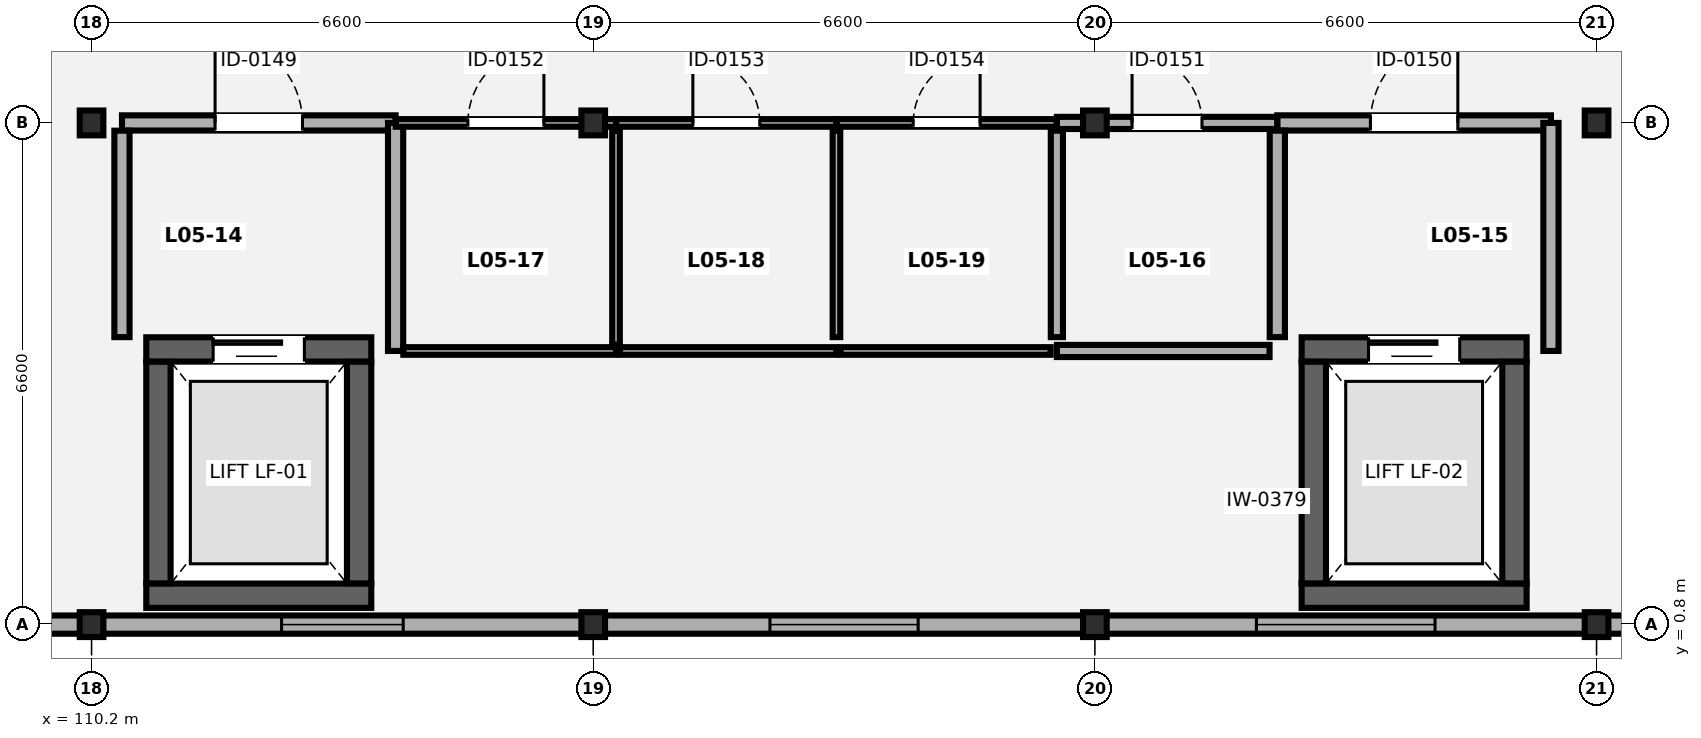
"""IFC4 building model, lengths in metres.
Left out: names, types, materials, properties, quantities, classifications, styles, units other than length and angle.
Written with IfcOpenShell. Run it as: python <this file> out.ifc"""

import sys

from ifc_helpers import new_model, si_unit, direction, frame, frame_2d, origin, origin_2d, place, context, subcontext, project, spatial, rectangle, i_section, extrude, element, fill, save


model = new_model("IFC4")
c1 = context("Model", 3, precision=1e-05, world=origin(), true_north=direction((0.0, 1.0)))
c2 = subcontext(c1, "Body", "Model", "MODEL_VIEW")
j1 = project(units=[si_unit("LENGTHUNIT", "METRE"), si_unit("PLANEANGLEUNIT", "RADIAN")], contexts=[c1])
p1 = place(None, origin())
s1 = spatial("IfcSite", under=j1, at=p1, CompositionType="ELEMENT")
p2 = place(p1, origin())
s2 = spatial("IfcBuilding", under=s1, at=p2, CompositionType="ELEMENT")
p3 = place(p2, frame((0.0, 0.0, 21.7)))
s3 = spatial("IfcBuildingStorey", under=s2, at=p3, CompositionType="ELEMENT", Elevation=21.7)
for number, where, z_axis, x_axis in (
    (1, (110.2, 0.8, 0.0), (0.0, 0.0, 1.0), (1.0, 0.0, 0.0)),
    (2, (110.2, 7.4, 0.0), (0.0, 0.0, 1.0), (1.0, 0.0, 0.0)),
    (3, (116.8, 0.8, 0.0), (0.0, 0.0, 1.0), (1.0, 0.0, 0.0)),
    (4, (116.8, 7.4, 0.0), (0.0, 0.0, 1.0), (1.0, 0.0, 0.0)),
    (5, (123.4, 0.8, 0.0), (0.0, 0.0, 1.0), (1.0, 0.0, 0.0)),
    (6, (123.4, 7.4, 0.0), (0.0, 0.0, 1.0), (1.0, 0.0, 0.0)),
    (7, (130.0, 0.8, 0.0), (0.0, 0.0, 1.0), (1.0, 0.0, 0.0)),
    (8, (130.0, 7.4, 0.0), (0.0, 0.0, 1.0), (1.0, 0.0, 0.0)),
):
    element("IfcColumn", number, at=place(p3, frame(where, z_axis=z_axis, x_axis=x_axis)), inside=s3, PredefinedType="COLUMN", context=c2, shape_type="SweptSolid", body=[
        extrude(i_section(OverallWidth=0.311, OverallDepth=0.327, WebThickness=0.016, FlangeThickness=0.025, FilletRadius=0.017, at=origin_2d()), origin(), (0.0, 0.0, 1.0), 4.2),
    ])
p4 = place(p3, frame((162.046, 0.8, 0.0), z_axis=(0.0, 0.0, 1.0), x_axis=(-1.0, 0.0, 0.0)))
e9 = element("IfcWall", 9, at=p4, inside=s3, PredefinedType="SOLIDWALL", context=c2, shape_type="SweptSolid", body=[
    extrude(rectangle(XDim=58.293, YDim=0.24, at=frame_2d((29.146, 0.0))), origin(), (0.0, 0.0, 1.0), 3.505),
])
p5 = place(p4, frame((54.471, 0.0, 0.85)))
e10 = element("IfcOpeningElement", 10, at=p5, cuts=e9, PredefinedType="OPENING", context=c2, shape_type="SweptSolid", body=[
    extrude(rectangle(XDim=1.35, YDim=1.5, at=frame_2d((0.675, 0.75))), frame((0.0, 0.13, 0.0), z_axis=(0.0, -1.0, 0.0), x_axis=(1.0, 0.0, 0.0)), (0.0, 0.0, 1.0), 0.26),
])
p6 = place(p4, frame((47.747, 0.0, 0.85)))
e11 = element("IfcOpeningElement", 11, at=p6, cuts=e9, PredefinedType="OPENING", context=c2, shape_type="SweptSolid", body=[
    extrude(rectangle(XDim=1.6, YDim=1.5, at=frame_2d((0.8, 0.75))), frame((0.0, 0.13, 0.0), z_axis=(0.0, -1.0, 0.0), x_axis=(1.0, 0.0, 0.0)), (0.0, 0.0, 1.0), 0.26),
])
p7 = place(p4, frame((40.971, 0.0, 0.85)))
e12 = element("IfcOpeningElement", 12, at=p7, cuts=e9, PredefinedType="OPENING", context=c2, shape_type="SweptSolid", body=[
    extrude(rectangle(XDim=1.95, YDim=1.5, at=frame_2d((0.975, 0.75))), frame((0.0, 0.13, 0.0), z_axis=(0.0, -1.0, 0.0), x_axis=(1.0, 0.0, 0.0)), (0.0, 0.0, 1.0), 0.26),
])
p8 = place(p4, frame((34.171, 0.0, 0.85)))
e13 = element("IfcOpeningElement", 13, at=p8, cuts=e9, PredefinedType="OPENING", context=c2, shape_type="SweptSolid", body=[
    extrude(rectangle(XDim=2.35, YDim=1.5, at=frame_2d((1.175, 0.75))), frame((0.0, 0.13, 0.0), z_axis=(0.0, -1.0, 0.0), x_axis=(1.0, 0.0, 0.0)), (0.0, 0.0, 1.0), 0.26),
])
p9 = place(p4, frame((27.396, 0.0, 0.85)))
e14 = element("IfcOpeningElement", 14, at=p9, cuts=e9, PredefinedType="OPENING", context=c2, shape_type="SweptSolid", body=[
    extrude(rectangle(XDim=2.7, YDim=1.35, at=frame_2d((1.35, 0.675))), frame((0.0, 0.13, 0.0), z_axis=(0.0, -1.0, 0.0), x_axis=(1.0, 0.0, 0.0)), (0.0, 0.0, 1.0), 0.26),
])
p10 = place(p4, frame((20.697, 0.0, 0.85)))
e15 = element("IfcOpeningElement", 15, at=p10, cuts=e9, PredefinedType="OPENING", context=c2, shape_type="SweptSolid", body=[
    extrude(rectangle(XDim=2.9, YDim=1.35, at=frame_2d((1.45, 0.675))), frame((0.0, 0.13, 0.0), z_axis=(0.0, -1.0, 0.0), x_axis=(1.0, 0.0, 0.0)), (0.0, 0.0, 1.0), 0.26),
])
p11 = place(p4, frame((14.997, 0.0, 0.85)))
e16 = element("IfcOpeningElement", 16, at=p11, cuts=e9, PredefinedType="OPENING", context=c2, shape_type="SweptSolid", body=[
    extrude(rectangle(XDim=1.1, YDim=1.4, at=frame_2d((0.55, 0.7))), frame((0.0, 0.13, 0.0), z_axis=(0.0, -1.0, 0.0), x_axis=(1.0, 0.0, 0.0)), (0.0, 0.0, 1.0), 0.26),
])
p12 = place(p4, frame((8.322, 0.0, 0.85)))
e17 = element("IfcOpeningElement", 17, at=p12, cuts=e9, PredefinedType="OPENING", context=c2, shape_type="SweptSolid", body=[
    extrude(rectangle(XDim=1.25, YDim=1.4, at=frame_2d((0.625, 0.7))), frame((0.0, 0.13, 0.0), z_axis=(0.0, -1.0, 0.0), x_axis=(1.0, 0.0, 0.0)), (0.0, 0.0, 1.0), 0.26),
])
p13 = place(p4, frame((2.046, 0.0, 0.85)))
e18 = element("IfcOpeningElement", 18, at=p13, cuts=e9, PredefinedType="OPENING", context=c2, shape_type="SweptSolid", body=[
    extrude(rectangle(XDim=1.4, YDim=1.4, at=frame_2d((0.7, 0.7))), frame((0.0, 0.13, 0.0), z_axis=(0.0, -1.0, 0.0), x_axis=(1.0, 0.0, 0.0)), (0.0, 0.0, 1.0), 0.26),
])
p14 = place(p3, frame((110.92, 1.18, 0.0), z_axis=(0.0, 0.0, 1.0), x_axis=(1.0, 0.0, 0.0)))
e19 = element("IfcWall", 19, at=p14, inside=s3, PredefinedType="SHEAR", context=c2, shape_type="SweptSolid", body=[
    extrude(rectangle(XDim=2.96, YDim=0.32, at=frame_2d((1.48, 0.0))), origin(), (0.0, 0.0, 1.0), 4.02),
])
p15 = place(p3, frame((110.92, 4.42, 0.0), z_axis=(0.0, 0.0, 1.0), x_axis=(1.0, 0.0, 0.0)))
e20 = element("IfcWall", 20, at=p15, inside=s3, PredefinedType="SHEAR", context=c2, shape_type="SweptSolid", body=[
    extrude(rectangle(XDim=2.96, YDim=0.32, at=frame_2d((1.48, 0.0))), origin(), (0.0, 0.0, 1.0), 4.02),
])
p16 = place(p15, frame((0.88, 0.0, 0.0)))
e21 = element("IfcOpeningElement", 21, at=p16, cuts=e20, PredefinedType="OPENING", context=c2, shape_type="SweptSolid", body=[
    extrude(rectangle(XDim=1.2, YDim=2.2, at=frame_2d((0.6, 1.1))), frame((0.0, 0.17, 0.0), z_axis=(0.0, -1.0, 0.0), x_axis=(1.0, 0.0, 0.0)), (0.0, 0.0, 1.0), 0.34),
])
for number, where, z_axis, x_axis in (
    (22, (111.08, 1.342, 0.0), (0.0, 0.0, 1.0), (0.0, 1.0, 0.0)),
    (23, (113.72, 1.342, 0.0), (0.0, 0.0, 1.0), (0.0, 1.0, 0.0)),
):
    element("IfcWall", number, at=place(p3, frame(where, z_axis=z_axis, x_axis=x_axis)), inside=s3, PredefinedType="SHEAR", context=c2, shape_type="SweptSolid", body=[
        extrude(rectangle(XDim=2.916, YDim=0.32, at=frame_2d((1.458, 0.0))), origin(), (0.0, 0.0, 1.0), 4.02),
    ])
p17 = place(p3, frame((126.12, 1.18, 0.0), z_axis=(0.0, 0.0, 1.0), x_axis=(1.0, 0.0, 0.0)))
e24 = element("IfcWall", 24, at=p17, inside=s3, PredefinedType="SHEAR", context=c2, shape_type="SweptSolid", body=[
    extrude(rectangle(XDim=2.96, YDim=0.32, at=frame_2d((1.48, 0.0))), origin(), (0.0, 0.0, 1.0), 4.02),
])
p18 = place(p3, frame((126.12, 4.42, 0.0), z_axis=(0.0, 0.0, 1.0), x_axis=(1.0, 0.0, 0.0)))
e25 = element("IfcWall", 25, at=p18, inside=s3, PredefinedType="SHEAR", context=c2, shape_type="SweptSolid", body=[
    extrude(rectangle(XDim=2.96, YDim=0.32, at=frame_2d((1.48, 0.0))), origin(), (0.0, 0.0, 1.0), 4.02),
])
p19 = place(p18, frame((0.88, 0.0, 0.0)))
e26 = element("IfcOpeningElement", 26, at=p19, cuts=e25, PredefinedType="OPENING", context=c2, shape_type="SweptSolid", body=[
    extrude(rectangle(XDim=1.2, YDim=2.2, at=frame_2d((0.6, 1.1))), frame((0.0, 0.17, 0.0), z_axis=(0.0, -1.0, 0.0), x_axis=(1.0, 0.0, 0.0)), (0.0, 0.0, 1.0), 0.34),
])
for number, where, z_axis, x_axis in (
    (27, (126.28, 1.342, 0.0), (0.0, 0.0, 1.0), (0.0, 1.0, 0.0)),
    (28, (128.92, 1.342, 0.0), (0.0, 0.0, 1.0), (0.0, 1.0, 0.0)),
):
    element("IfcWall", number, at=place(p3, frame(where, z_axis=z_axis, x_axis=x_axis)), inside=s3, PredefinedType="SHEAR", context=c2, shape_type="SweptSolid", body=[
        extrude(rectangle(XDim=2.916, YDim=0.32, at=frame_2d((1.458, 0.0))), origin(), (0.0, 0.0, 1.0), 4.02),
    ])
p20 = place(p3, frame((110.6, 7.4, 0.0), z_axis=(0.0, 0.0, 1.0), x_axis=(1.0, 0.0, 0.0)))
e29 = element("IfcWall", 29, at=p20, inside=s3, PredefinedType="SOLIDWALL", context=c2, shape_type="SweptSolid", body=[
    extrude(rectangle(XDim=3.6, YDim=0.2, at=frame_2d((1.8, 0.0))), origin(), (0.0, 0.0, 1.0), 3.293),
])
p21 = place(p20, frame((1.225, 0.0, 0.0)))
e30 = element("IfcOpeningElement", 30, at=p21, cuts=e29, PredefinedType="OPENING", context=c2, shape_type="SweptSolid", body=[
    extrude(rectangle(XDim=1.15, YDim=2.15, at=frame_2d((0.575, 1.075))), frame((0.0, 0.11, 0.0), z_axis=(0.0, -1.0, 0.0), x_axis=(1.0, 0.0, 0.0)), (0.0, 0.0, 1.0), 0.22),
])
p22 = place(p3, frame((110.6, 4.582, 0.0), z_axis=(0.0, 0.0, 1.0), x_axis=(0.0, 1.0, 0.0)))
e31 = element("IfcWall", 31, at=p22, inside=s3, PredefinedType="SOLIDWALL", context=c2, shape_type="SweptSolid", body=[
    extrude(rectangle(XDim=2.716, YDim=0.2, at=frame_2d((1.358, 0.0))), origin(), (0.0, 0.0, 1.0), 4.02),
])
p23 = place(p3, frame((114.2, 4.4, 0.0), z_axis=(0.0, 0.0, 1.0), x_axis=(0.0, 1.0, 0.0)))
e32 = element("IfcWall", 32, at=p23, inside=s3, PredefinedType="SOLIDWALL", context=c2, shape_type="SweptSolid", body=[
    extrude(rectangle(XDim=3.0, YDim=0.2, at=frame_2d((1.5, 0.0))), origin(), (0.0, 0.0, 1.0), 4.02),
])
p24 = place(p3, frame((125.8, 7.4, 0.0), z_axis=(0.0, 0.0, 1.0), x_axis=(1.0, 0.0, 0.0)))
e33 = element("IfcWall", 33, at=p24, inside=s3, PredefinedType="SOLIDWALL", context=c2, shape_type="SweptSolid", body=[
    extrude(rectangle(XDim=3.6, YDim=0.2, at=frame_2d((1.8, 0.0))), origin(), (0.0, 0.0, 1.0), 3.293),
])
p25 = place(p24, frame((1.225, 0.0, 0.0)))
e34 = element("IfcOpeningElement", 34, at=p25, cuts=e33, PredefinedType="OPENING", context=c2, shape_type="SweptSolid", body=[
    extrude(rectangle(XDim=1.15, YDim=2.15, at=frame_2d((0.575, 1.075))), frame((0.0, 0.11, 0.0), z_axis=(0.0, -1.0, 0.0), x_axis=(1.0, 0.0, 0.0)), (0.0, 0.0, 1.0), 0.22),
])
p26 = place(p3, frame((125.8, 4.582, 0.0), z_axis=(0.0, 0.0, 1.0), x_axis=(0.0, 1.0, 0.0)))
e35 = element("IfcWall", 35, at=p26, inside=s3, PredefinedType="SOLIDWALL", context=c2, shape_type="SweptSolid", body=[
    extrude(rectangle(XDim=2.716, YDim=0.2, at=frame_2d((1.358, 0.0))), origin(), (0.0, 0.0, 1.0), 4.02),
])
p27 = place(p3, frame((129.4, 4.4, 0.0), z_axis=(0.0, 0.0, 1.0), x_axis=(0.0, 1.0, 0.0)))
e36 = element("IfcWall", 36, at=p27, inside=s3, PredefinedType="SOLIDWALL", context=c2, shape_type="SweptSolid", body=[
    extrude(rectangle(XDim=3.0, YDim=0.2, at=frame_2d((1.5, 0.0))), origin(), (0.0, 0.0, 1.0), 4.02),
])
p28 = place(p3, frame((122.9, 4.4, 0.0), z_axis=(0.0, 0.0, 1.0), x_axis=(1.0, 0.0, 0.0)))
e37 = element("IfcWall", 37, at=p28, inside=s3, PredefinedType="PARTITIONING", context=c2, shape_type="SweptSolid", body=[
    extrude(rectangle(XDim=2.798, YDim=0.16, at=frame_2d((1.399, 0.0))), origin(), (0.0, 0.0, 1.0), 3.546),
])
p29 = place(p3, frame((122.9, 7.4, 0.0), z_axis=(0.0, 0.0, 1.0), x_axis=(1.0, 0.0, 0.0)))
e38 = element("IfcWall", 38, at=p29, inside=s3, PredefinedType="PARTITIONING", context=c2, shape_type="SweptSolid", body=[
    extrude(rectangle(XDim=2.898, YDim=0.16, at=frame_2d((1.449, 0.0))), origin(), (0.0, 0.0, 1.0), 3.293),
])
p30 = place(p29, frame((0.989, 0.0, 0.0)))
e39 = element("IfcOpeningElement", 39, at=p30, cuts=e38, PredefinedType="OPENING", context=c2, shape_type="SweptSolid", body=[
    extrude(rectangle(XDim=0.92, YDim=2.12, at=frame_2d((0.46, 1.06))), frame((0.0, 0.09, 0.0), z_axis=(0.0, -1.0, 0.0), x_axis=(1.0, 0.0, 0.0)), (0.0, 0.0, 1.0), 0.18),
])
p31 = place(p3, frame((122.9, 4.582, 0.0), z_axis=(0.0, 0.0, 1.0), x_axis=(0.0, 1.0, 0.0)))
e40 = element("IfcWall", 40, at=p31, inside=s3, PredefinedType="PARTITIONING", context=c2, shape_type="SweptSolid", body=[
    extrude(rectangle(XDim=2.716, YDim=0.16, at=frame_2d((1.358, 0.0))), origin(), (0.0, 0.0, 1.0), 4.02),
])
p32 = place(p3, frame((114.302, 4.4, 0.0), z_axis=(0.0, 0.0, 1.0), x_axis=(1.0, 0.0, 0.0)))
e41 = element("IfcWall", 41, at=p32, inside=s3, PredefinedType="PARTITIONING", context=c2, shape_type="SweptSolid", body=[
    extrude(rectangle(XDim=2.798, YDim=0.1, at=frame_2d((1.399, 0.0))), origin(), (0.0, 0.0, 1.0), 4.02),
])
p33 = place(p3, frame((114.202, 7.4, 0.0), z_axis=(0.0, 0.0, 1.0), x_axis=(1.0, 0.0, 0.0)))
e42 = element("IfcWall", 42, at=p33, inside=s3, PredefinedType="PARTITIONING", context=c2, shape_type="SweptSolid", body=[
    extrude(rectangle(XDim=2.898, YDim=0.1, at=frame_2d((1.449, 0.0))), origin(), (0.0, 0.0, 1.0), 3.293),
])
p34 = place(p33, frame((0.949, 0.0, 0.0)))
e43 = element("IfcOpeningElement", 43, at=p34, cuts=e42, PredefinedType="OPENING", context=c2, shape_type="SweptSolid", body=[
    extrude(rectangle(XDim=1.0, YDim=2.1, at=frame_2d((0.5, 1.05))), frame((0.0, 0.06, 0.0), z_axis=(0.0, -1.0, 0.0), x_axis=(1.0, 0.0, 0.0)), (0.0, 0.0, 1.0), 0.12),
])
p35 = place(p3, frame((117.1, 4.482, 0.0), z_axis=(0.0, 0.0, 1.0), x_axis=(0.0, 1.0, 0.0)))
e44 = element("IfcWall", 44, at=p35, inside=s3, PredefinedType="PARTITIONING", context=c2, shape_type="SweptSolid", body=[
    extrude(rectangle(XDim=2.816, YDim=0.1, at=frame_2d((1.408, 0.0))), origin(), (0.0, 0.0, 1.0), 4.02),
])
p36 = place(p3, frame((117.152, 4.4, 0.0), z_axis=(0.0, 0.0, 1.0), x_axis=(1.0, 0.0, 0.0)))
e45 = element("IfcWall", 45, at=p36, inside=s3, PredefinedType="PARTITIONING", context=c2, shape_type="SweptSolid", body=[
    extrude(rectangle(XDim=2.848, YDim=0.1, at=frame_2d((1.424, 0.0))), origin(), (0.0, 0.0, 1.0), 4.02),
])
p37 = place(p3, frame((117.102, 7.4, 0.0), z_axis=(0.0, 0.0, 1.0), x_axis=(1.0, 0.0, 0.0)))
e46 = element("IfcWall", 46, at=p37, inside=s3, PredefinedType="PARTITIONING", context=c2, shape_type="SweptSolid", body=[
    extrude(rectangle(XDim=2.898, YDim=0.1, at=frame_2d((1.449, 0.0))), origin(), (0.0, 0.0, 1.0), 3.293),
])
p38 = place(p37, frame((1.009, 0.0, 0.0)))
e47 = element("IfcOpeningElement", 47, at=p38, cuts=e46, PredefinedType="OPENING", context=c2, shape_type="SweptSolid", body=[
    extrude(rectangle(XDim=0.88, YDim=2.08, at=frame_2d((0.44, 1.04))), frame((0.0, 0.06, 0.0), z_axis=(0.0, -1.0, 0.0), x_axis=(1.0, 0.0, 0.0)), (0.0, 0.0, 1.0), 0.12),
])
p39 = place(p3, frame((120.0, 4.582, 0.0), z_axis=(0.0, 0.0, 1.0), x_axis=(0.0, 1.0, 0.0)))
e48 = element("IfcWall", 48, at=p39, inside=s3, PredefinedType="PARTITIONING", context=c2, shape_type="SweptSolid", body=[
    extrude(rectangle(XDim=2.716, YDim=0.1, at=frame_2d((1.358, 0.0))), origin(), (0.0, 0.0, 1.0), 4.02),
])
p40 = place(p3, frame((120.052, 4.4, 0.0), z_axis=(0.0, 0.0, 1.0), x_axis=(1.0, 0.0, 0.0)))
e49 = element("IfcWall", 49, at=p40, inside=s3, PredefinedType="PARTITIONING", context=c2, shape_type="SweptSolid", body=[
    extrude(rectangle(XDim=2.766, YDim=0.1, at=frame_2d((1.383, 0.0))), origin(), (0.0, 0.0, 1.0), 4.02),
])
p41 = place(p3, frame((120.002, 7.4, 0.0), z_axis=(0.0, 0.0, 1.0), x_axis=(1.0, 0.0, 0.0)))
e50 = element("IfcWall", 50, at=p41, inside=s3, PredefinedType="PARTITIONING", context=c2, shape_type="SweptSolid", body=[
    extrude(rectangle(XDim=2.896, YDim=0.1, at=frame_2d((1.448, 0.0))), origin(), (0.0, 0.0, 1.0), 3.293),
])
p42 = place(p41, frame((1.008, 0.0, 0.0)))
e51 = element("IfcOpeningElement", 51, at=p42, cuts=e50, PredefinedType="OPENING", context=c2, shape_type="SweptSolid", body=[
    extrude(rectangle(XDim=0.88, YDim=2.08, at=frame_2d((0.44, 1.04))), frame((0.0, 0.06, 0.0), z_axis=(0.0, -1.0, 0.0), x_axis=(1.0, 0.0, 0.0)), (0.0, 0.0, 1.0), 0.12),
])
p43 = place(p6, origin())
e52 = element("IfcWindow", 52, at=p43, inside=s3, PartitioningType="SINGLE_PANEL", PredefinedType="WINDOW", context=c2, shape_type="SweptSolid", body=[
    extrude(rectangle(XDim=1.6, YDim=1.5, at=frame_2d((0.8, 0.75))), frame((0.0, 0.03, 0.0), z_axis=(0.0, -1.0, 0.0), x_axis=(1.0, 0.0, 0.0)), (0.0, 0.0, 1.0), 0.06),
])
fill(e11, e52)
p44 = place(p7, origin())
e53 = element("IfcWindow", 53, at=p44, inside=s3, PartitioningType="SINGLE_PANEL", PredefinedType="WINDOW", context=c2, shape_type="SweptSolid", body=[
    extrude(rectangle(XDim=1.95, YDim=1.5, at=frame_2d((0.975, 0.75))), frame((0.0, 0.03, 0.0), z_axis=(0.0, -1.0, 0.0), x_axis=(1.0, 0.0, 0.0)), (0.0, 0.0, 1.0), 0.06),
])
fill(e12, e53)
p45 = place(p8, origin())
e54 = element("IfcWindow", 54, at=p45, inside=s3, PartitioningType="SINGLE_PANEL", PredefinedType="WINDOW", context=c2, shape_type="SweptSolid", body=[
    extrude(rectangle(XDim=2.35, YDim=1.5, at=frame_2d((1.175, 0.75))), frame((0.0, 0.03, 0.0), z_axis=(0.0, -1.0, 0.0), x_axis=(1.0, 0.0, 0.0)), (0.0, 0.0, 1.0), 0.06),
])
fill(e13, e54)
p46 = place(p16, origin())
e55 = element("IfcDoor", 55, at=p46, inside=s3, OperationType="SLIDING_TO_LEFT", PredefinedType="DOOR", context=c2, shape_type="SweptSolid", body=[
    extrude(rectangle(XDim=1.2, YDim=2.2, at=frame_2d((0.6, 1.1))), frame((0.0, 0.025, 0.0), z_axis=(0.0, -1.0, 0.0), x_axis=(1.0, 0.0, 0.0)), (0.0, 0.0, 1.0), 0.05),
])
fill(e21, e55)
p47 = place(p19, origin())
e56 = element("IfcDoor", 56, at=p47, inside=s3, OperationType="SLIDING_TO_LEFT", PredefinedType="DOOR", context=c2, shape_type="SweptSolid", body=[
    extrude(rectangle(XDim=1.2, YDim=2.2, at=frame_2d((0.6, 1.1))), frame((0.0, 0.025, 0.0), z_axis=(0.0, -1.0, 0.0), x_axis=(1.0, 0.0, 0.0)), (0.0, 0.0, 1.0), 0.05),
])
fill(e26, e56)
p48 = place(p21, origin())
e57 = element("IfcDoor", 57, at=p48, inside=s3, OperationType="SINGLE_SWING_LEFT", PredefinedType="DOOR", context=c2, shape_type="SweptSolid", body=[
    extrude(rectangle(XDim=1.15, YDim=2.15, at=frame_2d((0.575, 1.075))), frame((0.0, 0.025, 0.0), z_axis=(0.0, -1.0, 0.0), x_axis=(1.0, 0.0, 0.0)), (0.0, 0.0, 1.0), 0.05),
])
fill(e30, e57)
p49 = place(p25, origin())
e58 = element("IfcDoor", 58, at=p49, inside=s3, OperationType="SINGLE_SWING_RIGHT", PredefinedType="DOOR", context=c2, shape_type="SweptSolid", body=[
    extrude(rectangle(XDim=1.15, YDim=2.15, at=frame_2d((0.575, 1.075))), frame((0.0, 0.025, 0.0), z_axis=(0.0, -1.0, 0.0), x_axis=(1.0, 0.0, 0.0)), (0.0, 0.0, 1.0), 0.05),
])
fill(e34, e58)
p50 = place(p30, origin())
e59 = element("IfcDoor", 59, at=p50, inside=s3, OperationType="SINGLE_SWING_LEFT", PredefinedType="DOOR", context=c2, shape_type="SweptSolid", body=[
    extrude(rectangle(XDim=0.92, YDim=2.12, at=frame_2d((0.46, 1.06))), frame((0.0, 0.025, 0.0), z_axis=(0.0, -1.0, 0.0), x_axis=(1.0, 0.0, 0.0)), (0.0, 0.0, 1.0), 0.05),
])
fill(e39, e59)
p51 = place(p34, origin())
e60 = element("IfcDoor", 60, at=p51, inside=s3, OperationType="SINGLE_SWING_RIGHT", PredefinedType="DOOR", context=c2, shape_type="SweptSolid", body=[
    extrude(rectangle(XDim=1.0, YDim=2.1, at=frame_2d((0.5, 1.05))), frame((0.0, 0.025, 0.0), z_axis=(0.0, -1.0, 0.0), x_axis=(1.0, 0.0, 0.0)), (0.0, 0.0, 1.0), 0.05),
])
fill(e43, e60)
p52 = place(p38, origin())
e61 = element("IfcDoor", 61, at=p52, inside=s3, OperationType="SINGLE_SWING_LEFT", PredefinedType="DOOR", context=c2, shape_type="SweptSolid", body=[
    extrude(rectangle(XDim=0.88, YDim=2.08, at=frame_2d((0.44, 1.04))), frame((0.0, 0.025, 0.0), z_axis=(0.0, -1.0, 0.0), x_axis=(1.0, 0.0, 0.0)), (0.0, 0.0, 1.0), 0.05),
])
fill(e47, e61)
p53 = place(p42, origin())
e62 = element("IfcDoor", 62, at=p53, inside=s3, OperationType="SINGLE_SWING_RIGHT", PredefinedType="DOOR", context=c2, shape_type="SweptSolid", body=[
    extrude(rectangle(XDim=0.88, YDim=2.08, at=frame_2d((0.44, 1.04))), frame((0.0, 0.025, 0.0), z_axis=(0.0, -1.0, 0.0), x_axis=(1.0, 0.0, 0.0)), (0.0, 0.0, 1.0), 0.05),
])
fill(e51, e62)
save(model, sys.argv[1])
